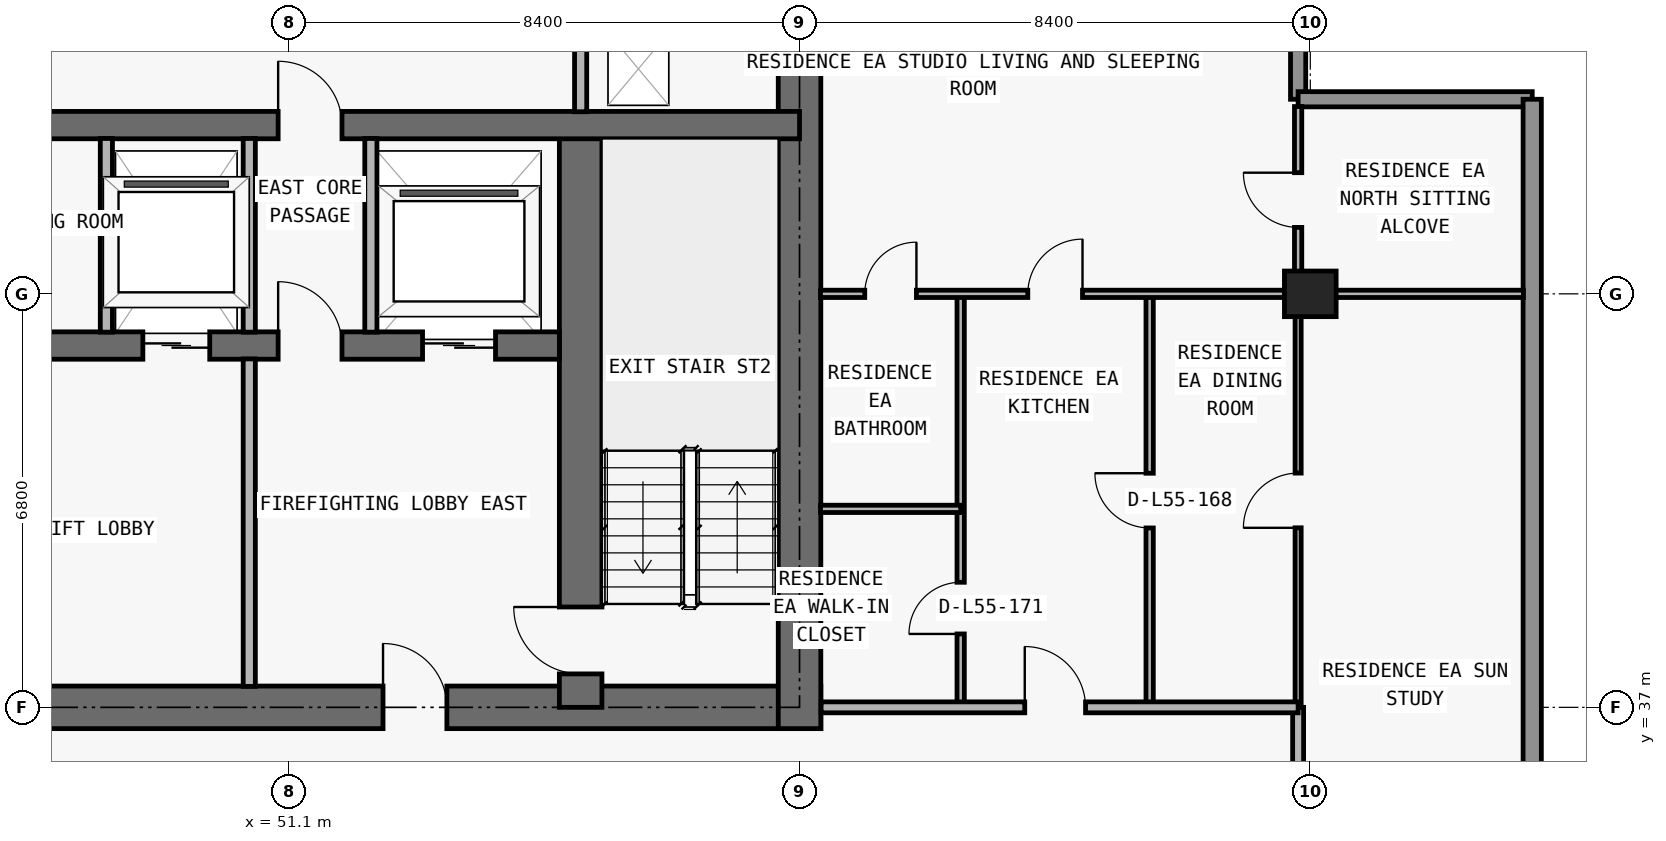
"""IFC4 building model, lengths in metres.
Left out: names, types, materials, properties, quantities, classifications, styles, units other than length and angle.
Written with IfcOpenShell. Run it as: python <this file> out.ifc"""

import sys

from ifc_helpers import new_model, si_unit, direction, frame, frame_2d, origin, origin_2d, place, context, subcontext, project, spatial, rectangle, extrude, element, fill, save


model = new_model("IFC4")
c1 = context("Model", 3, precision=1e-05, world=origin(), true_north=direction((0.0, 1.0)))
c2 = subcontext(c1, "Body", "Model", "MODEL_VIEW")
j1 = project(units=[si_unit("LENGTHUNIT", "METRE"), si_unit("PLANEANGLEUNIT", "RADIAN")], contexts=[c1])
p1 = place(None, origin())
s1 = spatial("IfcSite", under=j1, at=p1, CompositionType="ELEMENT")
p2 = place(p1, origin())
s2 = spatial("IfcBuilding", under=s1, at=p2, CompositionType="ELEMENT")
p3 = place(p2, frame((0.0, 0.0, 198.3)))
s3 = spatial("IfcBuildingStorey", under=s2, at=p3, CompositionType="ELEMENT", Elevation=198.3)
p4 = place(p3, frame((67.9, 43.8, 0.0), z_axis=(0.0, 0.0, 1.0), x_axis=(1.0, 0.0, 0.0)))
e1 = element("IfcColumn", 1, at=p4, inside=s3, PredefinedType="COLUMN", context=c2, shape_type="SweptSolid", body=[
    extrude(rectangle(XDim=0.85, YDim=0.75, at=origin_2d()), origin(), (0.0, 0.0, 1.0), 3.05),
])
p5 = place(p3, frame((17.95, 37.0, 0.0), z_axis=(0.0, 0.0, 1.0), x_axis=(1.0, 0.0, 0.0)))
e2 = element("IfcWall", 2, at=p5, inside=s3, PredefinedType="SHEAR", context=c2, shape_type="SweptSolid", body=[
    extrude(rectangle(XDim=41.9, YDim=0.7, at=frame_2d((20.95, 0.0))), origin(), (0.0, 0.0, 1.0), 3.05),
])
p6 = place(p5, frame((14.35, 0.0, 0.0)))
e3 = element("IfcOpeningElement", 3, at=p6, cuts=e2, PredefinedType="OPENING", context=c2, shape_type="SweptSolid", body=[
    extrude(rectangle(XDim=1.1, YDim=2.15, at=frame_2d((0.55, 1.075))), frame((0.0, 0.36, 0.0), z_axis=(0.0, -1.0, 0.0), x_axis=(1.0, 0.0, 0.0)), (0.0, 0.0, 1.0), 0.72),
])
p7 = place(p5, frame((6.2, 0.0, 0.0)))
e4 = element("IfcOpeningElement", 4, at=p7, cuts=e2, PredefinedType="OPENING", context=c2, shape_type="SweptSolid", body=[
    extrude(rectangle(XDim=1.05, YDim=2.15, at=frame_2d((0.525, 1.075))), frame((0.0, 0.36, 0.0), z_axis=(0.0, -1.0, 0.0), x_axis=(1.0, 0.0, 0.0)), (0.0, 0.0, 1.0), 0.72),
])
p8 = place(p5, frame((34.7, 0.0, 0.0)))
e5 = element("IfcOpeningElement", 5, at=p8, cuts=e2, PredefinedType="OPENING", context=c2, shape_type="SweptSolid", body=[
    extrude(rectangle(XDim=1.05, YDim=2.15, at=frame_2d((0.525, 1.075))), frame((0.0, 0.36, 0.0), z_axis=(0.0, -1.0, 0.0), x_axis=(1.0, 0.0, 0.0)), (0.0, 0.0, 1.0), 0.72),
])
p9 = place(p5, frame((10.812, 0.0, 0.0)))
e6 = element("IfcOpeningElement", 6, at=p9, cuts=e2, PredefinedType="OPENING", context=c2, shape_type="SweptSolid", body=[
    extrude(rectangle(XDim=1.05, YDim=2.15, at=frame_2d((0.525, 1.075))), frame((0.0, 0.36, 0.0), z_axis=(0.0, -1.0, 0.0), x_axis=(1.0, 0.0, 0.0)), (0.0, 0.0, 1.0), 0.72),
])
p10 = place(p5, frame((24.05, 0.0, 0.0)))
e7 = element("IfcOpeningElement", 7, at=p10, cuts=e2, PredefinedType="OPENING", context=c2, shape_type="SweptSolid", body=[
    extrude(rectangle(XDim=1.05, YDim=2.15, at=frame_2d((0.525, 1.075))), frame((0.0, 0.36, 0.0), z_axis=(0.0, -1.0, 0.0), x_axis=(1.0, 0.0, 0.0)), (0.0, 0.0, 1.0), 0.72),
])
p11 = place(p3, frame((59.5, 36.65, 0.0), z_axis=(0.0, 0.0, 1.0), x_axis=(0.0, 1.0, 0.0)))
e8 = element("IfcWall", 8, at=p11, inside=s3, PredefinedType="SHEAR", context=c2, shape_type="SweptSolid", body=[
    extrude(rectangle(XDim=13.95, YDim=0.7, at=frame_2d((6.975, 0.0))), origin(), (0.0, 0.0, 1.0), 3.05),
])
p12 = place(p3, frame((55.9, 37.0, 0.0), z_axis=(0.0, 0.0, 1.0), x_axis=(0.0, 1.0, 0.0)))
e9 = element("IfcWall", 9, at=p12, inside=s3, PredefinedType="SHEAR", context=c2, shape_type="SweptSolid", body=[
    extrude(rectangle(XDim=9.575, YDim=0.7, at=frame_2d((4.788, 0.0))), origin(), (0.0, 0.0, 1.0), 3.05),
])
p13 = place(p12, frame((0.55, 0.0, 0.0)))
e10 = element("IfcOpeningElement", 10, at=p13, cuts=e9, PredefinedType="OPENING", context=c2, shape_type="SweptSolid", body=[
    extrude(rectangle(XDim=1.1, YDim=2.15, at=frame_2d((0.55, 1.075))), frame((0.0, 0.36, 0.0), z_axis=(0.0, -1.0, 0.0), x_axis=(1.0, 0.0, 0.0)), (0.0, 0.0, 1.0), 0.72),
])
p14 = place(p3, frame((22.25, 42.95, 0.0), z_axis=(0.0, 0.0, 1.0), x_axis=(1.0, 0.0, 0.0)))
e11 = element("IfcWall", 11, at=p14, inside=s3, PredefinedType="SHEAR", context=c2, shape_type="SweptSolid", body=[
    extrude(rectangle(XDim=33.3, YDim=0.45, at=frame_2d((16.65, 0.0))), origin(), (0.0, 0.0, 1.0), 3.05),
])
p15 = place(p14, frame((1.05, 0.0, 0.0)))
e12 = element("IfcOpeningElement", 12, at=p15, cuts=e11, PredefinedType="OPENING", context=c2, shape_type="SweptSolid", body=[
    extrude(rectangle(XDim=1.2, YDim=2.2, at=frame_2d((0.6, 1.1))), frame((0.0, 0.235, 0.0), z_axis=(0.0, -1.0, 0.0), x_axis=(1.0, 0.0, 0.0)), (0.0, 0.0, 1.0), 0.47),
])
p16 = place(p14, frame((31.05, 0.0, 0.0)))
e13 = element("IfcOpeningElement", 13, at=p16, cuts=e11, PredefinedType="OPENING", context=c2, shape_type="SweptSolid", body=[
    extrude(rectangle(XDim=1.2, YDim=2.2, at=frame_2d((0.6, 1.1))), frame((0.0, 0.235, 0.0), z_axis=(0.0, -1.0, 0.0), x_axis=(1.0, 0.0, 0.0)), (0.0, 0.0, 1.0), 0.47),
])
p17 = place(p14, frame((26.45, 0.0, 0.0)))
e14 = element("IfcOpeningElement", 14, at=p17, cuts=e11, PredefinedType="OPENING", context=c2, shape_type="SweptSolid", body=[
    extrude(rectangle(XDim=1.1, YDim=2.2, at=frame_2d((0.55, 1.1))), frame((0.0, 0.235, 0.0), z_axis=(0.0, -1.0, 0.0), x_axis=(1.0, 0.0, 0.0)), (0.0, 0.0, 1.0), 0.47),
])
p18 = place(p14, frame((5.95, 0.0, 0.0)))
e15 = element("IfcOpeningElement", 15, at=p18, cuts=e11, PredefinedType="OPENING", context=c2, shape_type="SweptSolid", body=[
    extrude(rectangle(XDim=1.1, YDim=2.2, at=frame_2d((0.55, 1.1))), frame((0.0, 0.235, 0.0), z_axis=(0.0, -1.0, 0.0), x_axis=(1.0, 0.0, 0.0)), (0.0, 0.0, 1.0), 0.47),
])
p19 = place(p14, frame((3.625, 0.0, 0.0)))
e16 = element("IfcOpeningElement", 16, at=p19, cuts=e11, PredefinedType="OPENING", context=c2, shape_type="SweptSolid", body=[
    extrude(rectangle(XDim=1.05, YDim=2.15, at=frame_2d((0.525, 1.075))), frame((0.0, 0.235, 0.0), z_axis=(0.0, -1.0, 0.0), x_axis=(1.0, 0.0, 0.0)), (0.0, 0.0, 1.0), 0.47),
])
p20 = place(p14, frame((28.675, 0.0, 0.0)))
e17 = element("IfcOpeningElement", 17, at=p20, cuts=e11, PredefinedType="OPENING", context=c2, shape_type="SweptSolid", body=[
    extrude(rectangle(XDim=1.05, YDim=2.15, at=frame_2d((0.525, 1.075))), frame((0.0, 0.235, 0.0), z_axis=(0.0, -1.0, 0.0), x_axis=(1.0, 0.0, 0.0)), (0.0, 0.0, 1.0), 0.47),
])
p21 = place(p14, frame((15.225, 0.0, 0.0)))
e18 = element("IfcOpeningElement", 18, at=p21, cuts=e11, PredefinedType="OPENING", context=c2, shape_type="SweptSolid", body=[
    extrude(rectangle(XDim=1.0, YDim=2.2, at=frame_2d((0.5, 1.1))), frame((0.0, 0.235, 0.0), z_axis=(0.0, -1.0, 0.0), x_axis=(1.0, 0.0, 0.0)), (0.0, 0.0, 1.0), 0.47),
])
p22 = place(p14, frame((21.975, 0.0, 0.0)))
e19 = element("IfcOpeningElement", 19, at=p22, cuts=e11, PredefinedType="OPENING", context=c2, shape_type="SweptSolid", body=[
    extrude(rectangle(XDim=1.0, YDim=2.2, at=frame_2d((0.5, 1.1))), frame((0.0, 0.235, 0.0), z_axis=(0.0, -1.0, 0.0), x_axis=(1.0, 0.0, 0.0)), (0.0, 0.0, 1.0), 0.47),
])
p23 = place(p3, frame((18.3, 46.575, 0.0), z_axis=(0.0, 0.0, 1.0), x_axis=(1.0, 0.0, 0.0)))
e20 = element("IfcWall", 20, at=p23, inside=s3, PredefinedType="SHEAR", context=c2, shape_type="SweptSolid", body=[
    extrude(rectangle(XDim=41.2, YDim=0.45, at=frame_2d((20.6, 0.0))), origin(), (0.0, 0.0, 1.0), 3.05),
])
p24 = place(p23, frame((7.575, 0.0, 0.0)))
e21 = element("IfcOpeningElement", 21, at=p24, cuts=e20, PredefinedType="OPENING", context=c2, shape_type="SweptSolid", body=[
    extrude(rectangle(XDim=1.05, YDim=2.15, at=frame_2d((0.525, 1.075))), frame((0.0, 0.235, 0.0), z_axis=(0.0, -1.0, 0.0), x_axis=(1.0, 0.0, 0.0)), (0.0, 0.0, 1.0), 0.47),
])
p25 = place(p23, frame((32.625, 0.0, 0.0)))
e22 = element("IfcOpeningElement", 22, at=p25, cuts=e20, PredefinedType="OPENING", context=c2, shape_type="SweptSolid", body=[
    extrude(rectangle(XDim=1.05, YDim=2.15, at=frame_2d((0.525, 1.075))), frame((0.0, 0.235, 0.0), z_axis=(0.0, -1.0, 0.0), x_axis=(1.0, 0.0, 0.0)), (0.0, 0.0, 1.0), 0.47),
])
p26 = place(p3, frame((67.7, 50.45, 0.0), z_axis=(0.0, 0.0, 1.0), x_axis=(0.0, -1.0, 0.0)))
e23 = element("IfcWall", 23, at=p26, inside=s3, PredefinedType="ELEMENTEDWALL", context=c2, shape_type="SweptSolid", body=[
    extrude(rectangle(XDim=3.45, YDim=0.25, at=frame_2d((1.725, 0.0))), origin(), (0.0, 0.0, 1.0), 3.05),
])
p27 = place(p3, frame((67.7, 47.0, 0.0), z_axis=(0.0, 0.0, 1.0), x_axis=(1.0, 0.0, 0.0)))
e24 = element("IfcWall", 24, at=p27, inside=s3, PredefinedType="ELEMENTEDWALL", context=c2, shape_type="SweptSolid", body=[
    extrude(rectangle(XDim=3.85, YDim=0.25, at=frame_2d((1.925, 0.0))), origin(), (0.0, 0.0, 1.0), 3.05),
])
p28 = place(p3, frame((71.55, 47.0, 0.0), z_axis=(0.0, 0.0, 1.0), x_axis=(0.0, -1.0, 0.0)))
e25 = element("IfcWall", 25, at=p28, inside=s3, PredefinedType="STANDARD", context=c2, shape_type="SweptSolid", body=[
    extrude(rectangle(XDim=17.9, YDim=0.3, at=frame_2d((8.95, 0.0))), origin(), (0.0, 0.0, 1.0), 3.05),
])
p29 = place(p3, frame((48.1, 43.17, 0.0), z_axis=(0.0, 0.0, 1.0), x_axis=(0.0, 1.0, 0.0)))
e26 = element("IfcWall", 26, at=p29, inside=s3, PredefinedType="PARTITIONING", context=c2, shape_type="SweptSolid", body=[
    extrude(rectangle(XDim=3.185, YDim=0.2, at=frame_2d((1.593, 0.0))), origin(), (0.0, 0.0, 1.0), 3.05),
])
p30 = place(p3, frame((50.45, 37.345, 0.0), z_axis=(0.0, 0.0, 1.0), x_axis=(0.0, 1.0, 0.0)))
e27 = element("IfcWall", 27, at=p30, inside=s3, PredefinedType="PARTITIONING", context=c2, shape_type="SweptSolid", body=[
    extrude(rectangle(XDim=5.385, YDim=0.2, at=frame_2d((2.692, 0.0))), origin(), (0.0, 0.0, 1.0), 3.05),
])
for number, where, z_axis, x_axis in (
    (28, (50.45, 43.17, 0.0), (0.0, 0.0, 1.0), (0.0, 1.0, 0.0)),
    (29, (52.45, 43.17, 0.0), (0.0, 0.0, 1.0), (0.0, 1.0, 0.0)),
):
    element("IfcWall", number, at=place(p3, frame(where, z_axis=z_axis, x_axis=x_axis)), inside=s3, PredefinedType="PARTITIONING", context=c2, shape_type="SweptSolid", body=[
        extrude(rectangle(XDim=3.185, YDim=0.2, at=frame_2d((1.593, 0.0))), origin(), (0.0, 0.0, 1.0), 3.05),
    ])
p31 = place(p3, frame((55.9, 46.795, 0.0), z_axis=(0.0, 0.0, 1.0), x_axis=(0.0, 1.0, 0.0)))
e30 = element("IfcWall", 30, at=p31, inside=s3, PredefinedType="PARTITIONING", context=c2, shape_type="SweptSolid", body=[
    extrude(rectangle(XDim=3.16, YDim=0.2, at=frame_2d((1.58, 0.0))), origin(), (0.0, 0.0, 1.0), 3.05),
])
p32 = place(p3, frame((62.15, 37.0, 0.0), z_axis=(0.0, 0.0, 1.0), x_axis=(0.0, 1.0, 0.0)))
e31 = element("IfcWall", 31, at=p32, inside=s3, PredefinedType="PARTITIONING", context=c2, shape_type="SweptSolid", body=[
    extrude(rectangle(XDim=6.8, YDim=0.12, at=frame_2d((3.4, 0.0))), origin(), (0.0, 0.0, 1.0), 3.05),
])
p33 = place(p32, frame((1.207, 0.0, 0.0)))
e32 = element("IfcOpeningElement", 32, at=p33, cuts=e31, PredefinedType="OPENING", context=c2, shape_type="SweptSolid", body=[
    extrude(rectangle(XDim=0.85, YDim=2.1, at=frame_2d((0.425, 1.05))), frame((0.0, 0.07, 0.0), z_axis=(0.0, -1.0, 0.0), x_axis=(1.0, 0.0, 0.0)), (0.0, 0.0, 1.0), 0.14),
])
p34 = place(p3, frame((65.258, 37.0, 0.0), z_axis=(0.0, 0.0, 1.0), x_axis=(0.0, 1.0, 0.0)))
e33 = element("IfcWall", 33, at=p34, inside=s3, PredefinedType="PARTITIONING", context=c2, shape_type="SweptSolid", body=[
    extrude(rectangle(XDim=6.8, YDim=0.12, at=frame_2d((3.4, 0.0))), origin(), (0.0, 0.0, 1.0), 3.05),
])
p35 = place(p34, frame((2.95, 0.0, 0.0)))
e34 = element("IfcOpeningElement", 34, at=p35, cuts=e33, PredefinedType="OPENING", context=c2, shape_type="SweptSolid", body=[
    extrude(rectangle(XDim=0.9, YDim=2.15, at=frame_2d((0.45, 1.075))), frame((0.0, 0.07, 0.0), z_axis=(0.0, -1.0, 0.0), x_axis=(1.0, 0.0, 0.0)), (0.0, 0.0, 1.0), 0.14),
])
p36 = place(p3, frame((67.7, 34.705, 0.0), z_axis=(0.0, 0.0, 1.0), x_axis=(0.0, 1.0, 0.0)))
e35 = element("IfcWall", 35, at=p36, inside=s3, PredefinedType="PARTITIONING", context=c2, shape_type="SweptSolid", body=[
    extrude(rectangle(XDim=2.295, YDim=0.18, at=frame_2d((1.147, 0.0))), origin(), (0.0, 0.0, 1.0), 2.263),
])
p37 = place(p3, frame((67.7, 37.005, 0.0), z_axis=(0.0, 0.0, 1.0), x_axis=(0.0, 1.0, 0.0)))
e36 = element("IfcWall", 36, at=p37, inside=s3, PredefinedType="MOVABLE", context=c2, shape_type="SweptSolid", body=[
    extrude(rectangle(XDim=6.795, YDim=0.1, at=frame_2d((3.397, 0.0))), origin(), (0.0, 0.0, 1.0), 2.263),
])
p38 = place(p37, frame((2.948, 0.0, 0.0)))
e37 = element("IfcOpeningElement", 37, at=p38, cuts=e36, PredefinedType="OPENING", context=c2, shape_type="SweptSolid", body=[
    extrude(rectangle(XDim=0.9, YDim=2.15, at=frame_2d((0.45, 1.075))), frame((0.0, 0.06, 0.0), z_axis=(0.0, -1.0, 0.0), x_axis=(1.0, 0.0, 0.0)), (0.0, 0.0, 1.0), 0.12),
])
p39 = place(p3, frame((67.7, 43.805, 0.0), z_axis=(0.0, 0.0, 1.0), x_axis=(0.0, 1.0, 0.0)))
e38 = element("IfcWall", 38, at=p39, inside=s3, PredefinedType="PARTITIONING", context=c2, shape_type="SweptSolid", body=[
    extrude(rectangle(XDim=3.075, YDim=0.12, at=frame_2d((1.538, 0.0))), origin(), (0.0, 0.0, 1.0), 3.05),
])
p40 = place(p39, frame((1.087, 0.0, 0.0)))
e39 = element("IfcOpeningElement", 39, at=p40, cuts=e38, PredefinedType="OPENING", context=c2, shape_type="SweptSolid", body=[
    extrude(rectangle(XDim=0.9, YDim=2.15, at=frame_2d((0.45, 1.075))), frame((0.0, 0.07, 0.0), z_axis=(0.0, -1.0, 0.0), x_axis=(1.0, 0.0, 0.0)), (0.0, 0.0, 1.0), 0.14),
])
p41 = place(p3, frame((59.855, 37.0, 0.0), z_axis=(0.0, 0.0, 1.0), x_axis=(1.0, 0.0, 0.0)))
e40 = element("IfcWall", 40, at=p41, inside=s3, PredefinedType="PARTITIONING", context=c2, shape_type="SweptSolid", body=[
    extrude(rectangle(XDim=7.845, YDim=0.18, at=frame_2d((3.922, 0.0))), origin(), (0.0, 0.0, 1.0), 3.05),
])
p42 = place(p41, frame((3.349, 0.0, 0.0)))
e41 = element("IfcOpeningElement", 41, at=p42, cuts=e40, PredefinedType="OPENING", context=c2, shape_type="SweptSolid", body=[
    extrude(rectangle(XDim=1.0, YDim=2.2, at=frame_2d((0.5, 1.1))), frame((0.0, 0.1, 0.0), z_axis=(0.0, -1.0, 0.0), x_axis=(1.0, 0.0, 0.0)), (0.0, 0.0, 1.0), 0.2),
])
p43 = place(p3, frame((59.845, 40.264, 0.0), z_axis=(0.0, 0.0, 1.0), x_axis=(1.0, 0.0, 0.0)))
e42 = element("IfcWall", 42, at=p43, inside=s3, PredefinedType="PARTITIONING", context=c2, shape_type="SweptSolid", body=[
    extrude(rectangle(XDim=2.305, YDim=0.12, at=frame_2d((1.152, 0.0))), origin(), (0.0, 0.0, 1.0), 3.05),
])
p44 = place(p3, frame((59.845, 43.8, 0.0), z_axis=(0.0, 0.0, 1.0), x_axis=(1.0, 0.0, 0.0)))
e43 = element("IfcWall", 43, at=p44, inside=s3, PredefinedType="PARTITIONING", context=c2, shape_type="SweptSolid", body=[
    extrude(rectangle(XDim=11.56, YDim=0.12, at=frame_2d((5.78, 0.0))), origin(), (0.0, 0.0, 1.0), 2.418),
])
p45 = place(p44, frame((3.409, 0.0, 0.0)))
e44 = element("IfcOpeningElement", 44, at=p45, cuts=e43, PredefinedType="OPENING", context=c2, shape_type="SweptSolid", body=[
    extrude(rectangle(XDim=0.9, YDim=2.15, at=frame_2d((0.45, 1.075))), frame((0.0, 0.07, 0.0), z_axis=(0.0, -1.0, 0.0), x_axis=(1.0, 0.0, 0.0)), (0.0, 0.0, 1.0), 0.14),
])
p46 = place(p44, frame((0.728, 0.0, 0.0)))
e45 = element("IfcOpeningElement", 45, at=p46, cuts=e43, PredefinedType="OPENING", context=c2, shape_type="SweptSolid", body=[
    extrude(rectangle(XDim=0.85, YDim=2.1, at=frame_2d((0.425, 1.05))), frame((0.0, 0.07, 0.0), z_axis=(0.0, -1.0, 0.0), x_axis=(1.0, 0.0, 0.0)), (0.0, 0.0, 1.0), 0.14),
])
p47 = place(p16, origin())
e46 = element("IfcDoor", 46, at=p47, inside=s3, OperationType="DOUBLE_DOOR_SLIDING", PredefinedType="DOOR", context=c2, shape_type="SweptSolid", body=[
    extrude(rectangle(XDim=1.2, YDim=2.2, at=frame_2d((0.6, 1.1))), frame((0.0, 0.025, 0.0), z_axis=(0.0, -1.0, 0.0), x_axis=(1.0, 0.0, 0.0)), (0.0, 0.0, 1.0), 0.05),
])
fill(e13, e46)
p48 = place(p17, origin())
e47 = element("IfcDoor", 47, at=p48, inside=s3, OperationType="DOUBLE_DOOR_SLIDING", PredefinedType="DOOR", context=c2, shape_type="SweptSolid", body=[
    extrude(rectangle(XDim=1.1, YDim=2.2, at=frame_2d((0.55, 1.1))), frame((0.0, 0.025, 0.0), z_axis=(0.0, -1.0, 0.0), x_axis=(1.0, 0.0, 0.0)), (0.0, 0.0, 1.0), 0.05),
])
fill(e14, e47)
p49 = place(p8, origin())
e48 = element("IfcDoor", 48, at=p49, inside=s3, OperationType="SINGLE_SWING_LEFT", PredefinedType="DOOR", context=c2, shape_type="SweptSolid", body=[
    extrude(rectangle(XDim=1.05, YDim=2.15, at=frame_2d((0.525, 1.075))), frame((0.0, 0.025, 0.0), z_axis=(0.0, -1.0, 0.0), x_axis=(1.0, 0.0, 0.0)), (0.0, 0.0, 1.0), 0.05),
])
fill(e5, e48)
p50 = place(p13, origin())
e49 = element("IfcDoor", 49, at=p50, inside=s3, OperationType="SINGLE_SWING_RIGHT", PredefinedType="DOOR", context=c2, shape_type="SweptSolid", body=[
    extrude(rectangle(XDim=1.1, YDim=2.15, at=frame_2d((0.55, 1.075))), frame((0.0, 0.025, 0.0), z_axis=(0.0, -1.0, 0.0), x_axis=(1.0, 0.0, 0.0)), (0.0, 0.0, 1.0), 0.05),
])
fill(e10, e49)
p51 = place(p20, origin())
e50 = element("IfcDoor", 50, at=p51, inside=s3, OperationType="SINGLE_SWING_LEFT", PredefinedType="DOOR", context=c2, shape_type="SweptSolid", body=[
    extrude(rectangle(XDim=1.05, YDim=2.15, at=frame_2d((0.525, 1.075))), frame((0.0, 0.025, 0.0), z_axis=(0.0, -1.0, 0.0), x_axis=(1.0, 0.0, 0.0)), (0.0, 0.0, 1.0), 0.05),
])
fill(e17, e50)
p52 = place(p25, origin())
e51 = element("IfcDoor", 51, at=p52, inside=s3, OperationType="SINGLE_SWING_LEFT", PredefinedType="DOOR", context=c2, shape_type="SweptSolid", body=[
    extrude(rectangle(XDim=1.05, YDim=2.15, at=frame_2d((0.525, 1.075))), frame((0.0, 0.025, 0.0), z_axis=(0.0, -1.0, 0.0), x_axis=(1.0, 0.0, 0.0)), (0.0, 0.0, 1.0), 0.05),
])
fill(e22, e51)
p53 = place(p35, origin())
e52 = element("IfcDoor", 52, at=p53, inside=s3, OperationType="SINGLE_SWING_RIGHT", PredefinedType="DOOR", context=c2, shape_type="SweptSolid", body=[
    extrude(rectangle(XDim=0.9, YDim=2.15, at=frame_2d((0.45, 1.075))), frame((0.0, 0.025, 0.0), z_axis=(0.0, -1.0, 0.0), x_axis=(1.0, 0.0, 0.0)), (0.0, 0.0, 1.0), 0.05),
])
fill(e34, e52)
p54 = place(p42, origin())
e53 = element("IfcDoor", 53, at=p54, inside=s3, OperationType="SINGLE_SWING_LEFT", PredefinedType="DOOR", context=c2, shape_type="SweptSolid", body=[
    extrude(rectangle(XDim=1.0, YDim=2.2, at=frame_2d((0.5, 1.1))), frame((0.0, 0.025, 0.0), z_axis=(0.0, -1.0, 0.0), x_axis=(1.0, 0.0, 0.0)), (0.0, 0.0, 1.0), 0.05),
])
fill(e41, e53)
p55 = place(p45, origin())
e54 = element("IfcDoor", 54, at=p55, inside=s3, OperationType="SINGLE_SWING_RIGHT", PredefinedType="DOOR", context=c2, shape_type="SweptSolid", body=[
    extrude(rectangle(XDim=0.9, YDim=2.15, at=frame_2d((0.45, 1.075))), frame((0.0, 0.025, 0.0), z_axis=(0.0, -1.0, 0.0), x_axis=(1.0, 0.0, 0.0)), (0.0, 0.0, 1.0), 0.05),
])
fill(e44, e54)
p56 = place(p33, origin())
e55 = element("IfcDoor", 55, at=p56, inside=s3, OperationType="SINGLE_SWING_LEFT", PredefinedType="DOOR", context=c2, shape_type="SweptSolid", body=[
    extrude(rectangle(XDim=0.85, YDim=2.1, at=frame_2d((0.425, 1.05))), frame((0.0, 0.025, 0.0), z_axis=(0.0, -1.0, 0.0), x_axis=(1.0, 0.0, 0.0)), (0.0, 0.0, 1.0), 0.05),
])
fill(e32, e55)
p57 = place(p46, origin())
e56 = element("IfcDoor", 56, at=p57, inside=s3, OperationType="SINGLE_SWING_RIGHT", PredefinedType="DOOR", context=c2, shape_type="SweptSolid", body=[
    extrude(rectangle(XDim=0.85, YDim=2.1, at=frame_2d((0.425, 1.05))), frame((0.0, 0.025, 0.0), z_axis=(0.0, -1.0, 0.0), x_axis=(1.0, 0.0, 0.0)), (0.0, 0.0, 1.0), 0.05),
])
fill(e45, e56)
p58 = place(p38, origin())
e57 = element("IfcDoor", 57, at=p58, inside=s3, OperationType="SINGLE_SWING_LEFT", PredefinedType="DOOR", context=c2, shape_type="SweptSolid", body=[
    extrude(rectangle(XDim=0.9, YDim=2.15, at=frame_2d((0.45, 1.075))), frame((0.0, 0.025, 0.0), z_axis=(0.0, -1.0, 0.0), x_axis=(1.0, 0.0, 0.0)), (0.0, 0.0, 1.0), 0.05),
])
fill(e37, e57)
p59 = place(p40, origin())
e58 = element("IfcDoor", 58, at=p59, inside=s3, OperationType="SINGLE_SWING_RIGHT", PredefinedType="DOOR", context=c2, shape_type="SweptSolid", body=[
    extrude(rectangle(XDim=0.9, YDim=2.15, at=frame_2d((0.45, 1.075))), frame((0.0, 0.025, 0.0), z_axis=(0.0, -1.0, 0.0), x_axis=(1.0, 0.0, 0.0)), (0.0, 0.0, 1.0), 0.05),
])
fill(e39, e58)
save(model, sys.argv[1])
